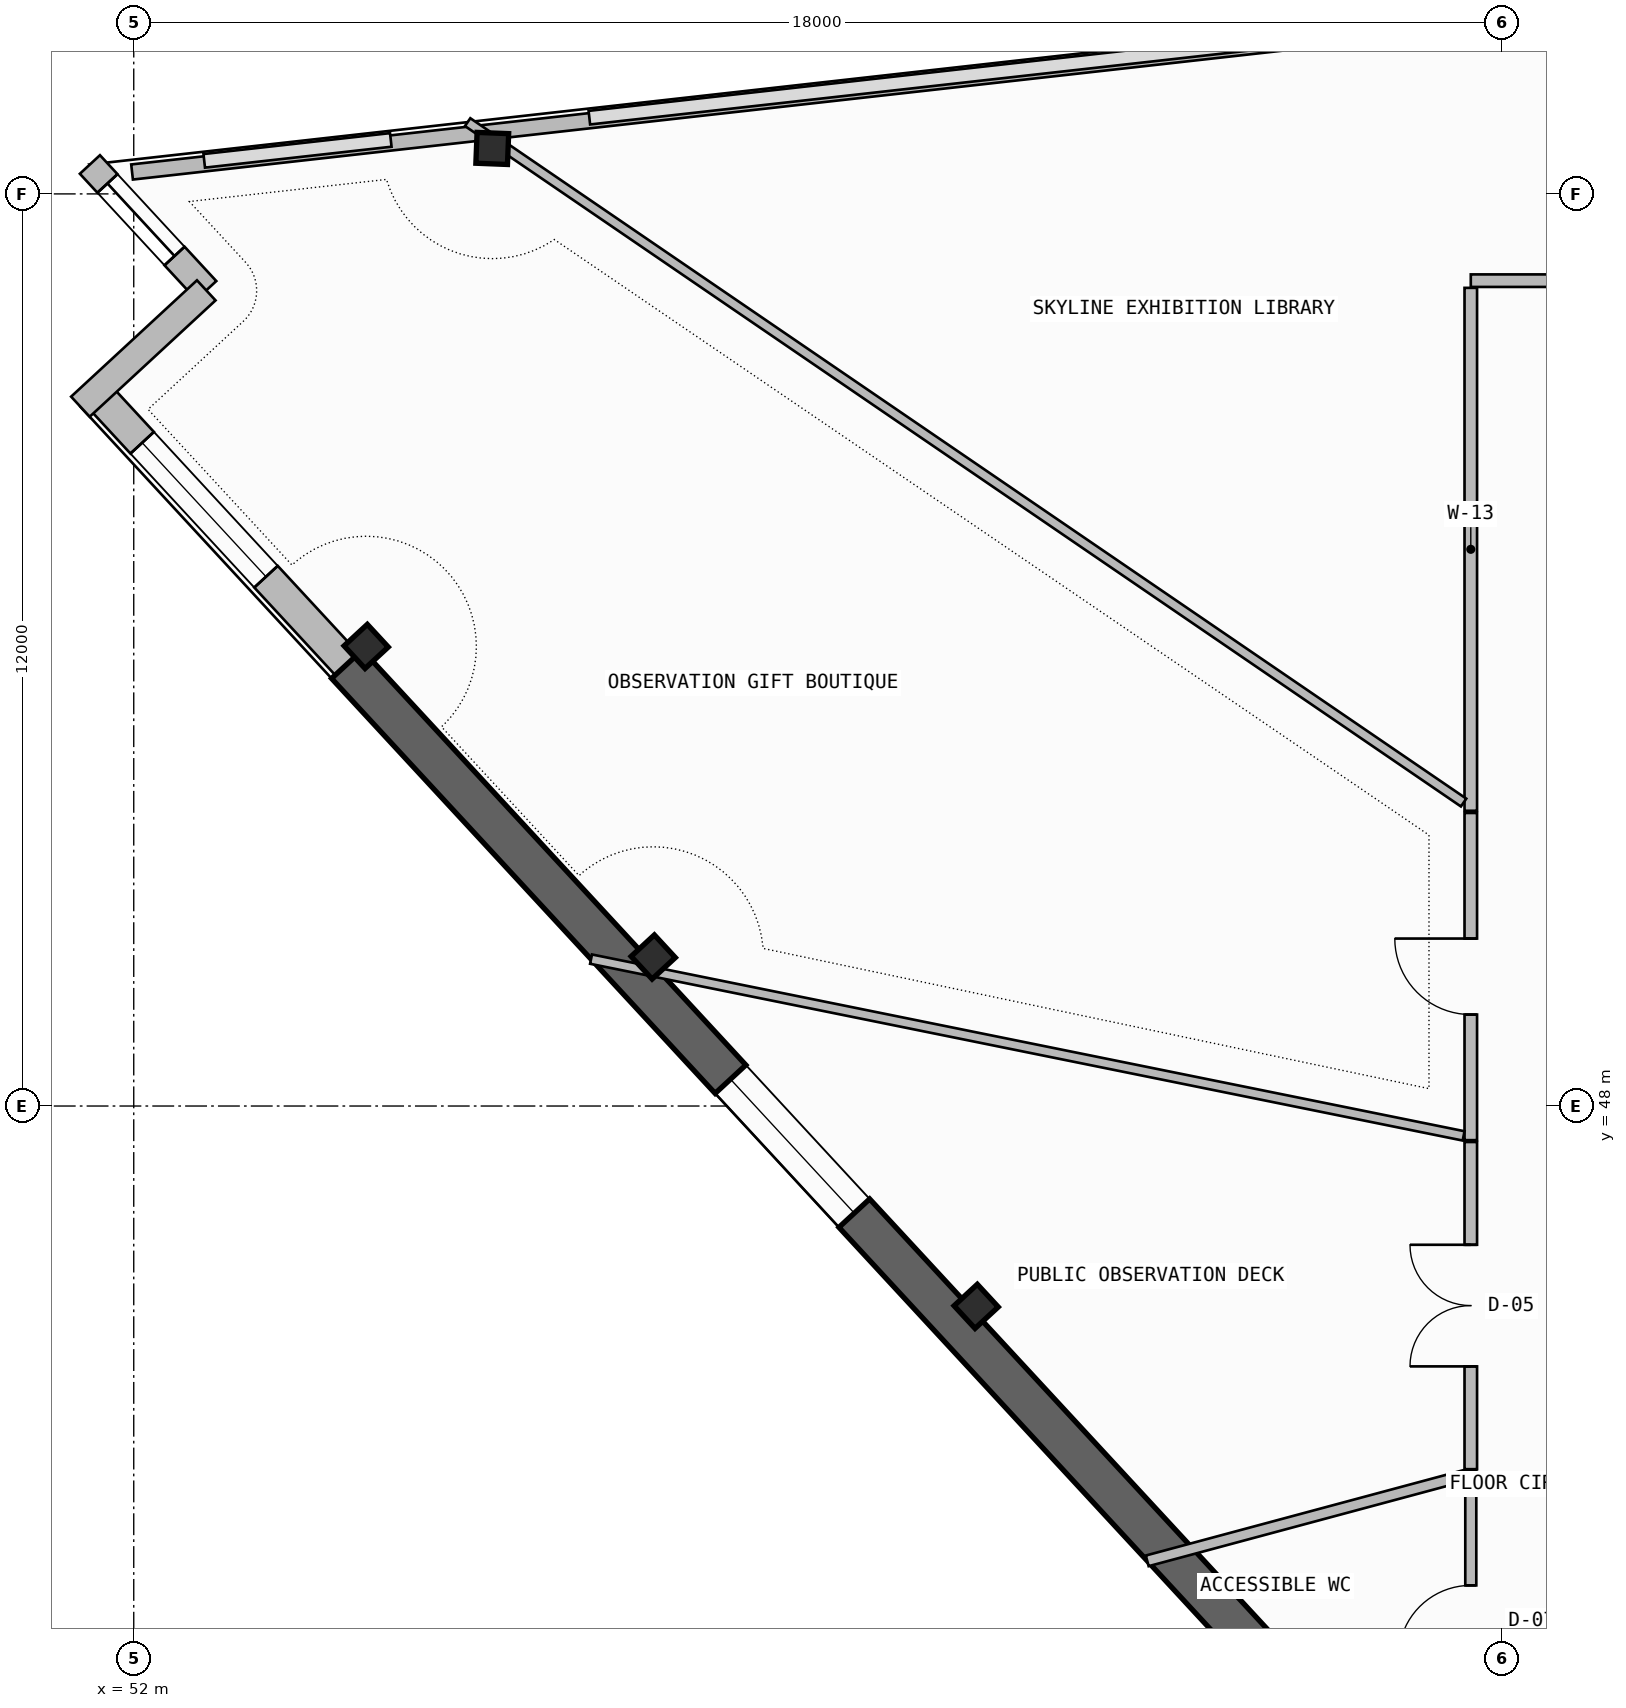
"""IFC4 building model, lengths in metres.
Left out: names, types, materials, properties, quantities, classifications, styles, units other than length and angle.
Written with IfcOpenShell. Run it as: python <this file> out.ifc"""

import sys

from ifc_helpers import new_model, si_unit, direction, frame, frame_2d, origin, origin_2d, place, context, subcontext, project, spatial, rectangle, i_section, extrude, element, fill, save


model = new_model("IFC4")
c1 = context("Model", 3, precision=1e-05, world=origin(), true_north=direction((0.0, 1.0)))
c2 = subcontext(c1, "Body", "Model", "MODEL_VIEW")
j1 = project(units=[si_unit("LENGTHUNIT", "METRE"), si_unit("PLANEANGLEUNIT", "RADIAN")], contexts=[c1])
p1 = place(None, origin())
s1 = spatial("IfcSite", under=j1, at=p1, CompositionType="ELEMENT")
p2 = place(p1, origin())
s2 = spatial("IfcBuilding", under=s1, at=p2, CompositionType="ELEMENT")
p3 = place(p2, frame((0.0, 0.0, 288.9)))
s3 = spatial("IfcBuildingStorey", under=s2, at=p3, CompositionType="ELEMENT", Elevation=288.9)
for number, where, z_axis, x_axis in (
    (1, (56.717, 60.598, 0.0), (0.0, 0.0, 1.0), (0.039, 0.999, 0.0)),
    (2, (55.058, 54.046, 0.0), (0.0, 0.0, 1.0), (-0.679, 0.734, 0.0)),
    (3, (58.835, 49.961, 0.0), (0.0, 0.0, 1.0), (-0.679, 0.734, 0.0)),
    (4, (63.084, 45.364, 0.0), (0.0, 0.0, 1.0), (-0.679, 0.734, 0.0)),
):
    element("IfcColumn", number, at=place(p3, frame(where, z_axis=z_axis, x_axis=x_axis)), inside=s3, PredefinedType="COLUMN", context=c2, shape_type="SweptSolid", body=[
        extrude(i_section(OverallWidth=0.406, OverallDepth=0.416, WebThickness=0.03, FlangeThickness=0.048, FilletRadius=0.015, at=origin_2d()), origin(), (0.0, 0.0, 1.0), 3.52),
    ])
p4 = place(p3, frame((51.5, 57.387, 0.0), z_axis=(0.0, 0.0, 1.0), x_axis=(0.67880684669, -0.734316869537, 0.0)))
e5 = element("IfcWall", 5, at=p4, inside=s3, PredefinedType="SOLIDWALL", context=c2, shape_type="SweptSolid", body=[
    extrude(rectangle(XDim=4.869, YDim=0.42, at=frame_2d((2.434, 0.0))), origin(), (0.0, 0.0, 1.0), 2.645),
])
p5 = place(p4, frame((0.9, 0.0, 1.1)))
e6 = element("IfcOpeningElement", 6, at=p5, cuts=e5, PredefinedType="OPENING", context=c2, shape_type="SweptSolid", body=[
    extrude(rectangle(XDim=2.4, YDim=1.2, at=frame_2d((1.2, 0.6))), frame((0.0, 0.22, 0.0), z_axis=(0.0, -1.0, 0.0), x_axis=(1.0, 0.0, 0.0)), (0.0, 0.0, 1.0), 0.44),
])
p6 = place(p3, frame((54.805, 53.812, -0.26), z_axis=(0.0, 0.0, 1.0), x_axis=(0.678803115619, -0.734320318543, 0.0)))
e7 = element("IfcWall", 7, at=p6, inside=s3, PredefinedType="SHEAR", context=c2, shape_type="SweptSolid", body=[
    extrude(rectangle(XDim=18.083, YDim=0.55, at=frame_2d((9.042, 0.0))), origin(), (0.0, 0.0, 1.0), 3.52),
])
p7 = place(p6, frame((7.434, 0.0, 1.1)))
e8 = element("IfcOpeningElement", 8, at=p7, cuts=e7, PredefinedType="OPENING", context=c2, shape_type="SweptSolid", body=[
    extrude(rectangle(XDim=2.4, YDim=1.2, at=frame_2d((1.2, 0.6))), frame((0.0, 0.285, 0.0), z_axis=(0.0, -1.0, 0.0), x_axis=(1.0, 0.0, 0.0)), (0.0, 0.0, 1.0), 0.57),
])
p8 = place(p3, frame((51.423, 60.387, 0.0), z_axis=(0.0, 0.0, 1.0), x_axis=(0.678792531533, -0.734330102294, 0.0)))
e9 = element("IfcWall", 9, at=p8, inside=s3, PredefinedType="SOLIDWALL", context=c2, shape_type="SweptSolid", body=[
    extrude(rectangle(XDim=2.255, YDim=0.36, at=frame_2d((1.127, 0.0))), origin(), (0.0, 0.0, 1.0), 3.26),
])
p9 = place(p8, frame((0.34, 0.0, 0.45)))
e10 = element("IfcOpeningElement", 10, at=p9, cuts=e9, PredefinedType="OPENING", context=c2, shape_type="SweptSolid", body=[
    extrude(rectangle(XDim=1.3, YDim=2.4, at=frame_2d((0.65, 1.2))), frame((0.0, 0.19, 0.0), z_axis=(0.0, -1.0, 0.0), x_axis=(1.0, 0.0, 0.0)), (0.0, 0.0, 1.0), 0.38),
])
p10 = place(p3, frame((52.954, 58.731, 0.0), z_axis=(0.0, 0.0, 1.0), x_axis=(-0.734330102294, -0.678792531533, 0.0)))
e11 = element("IfcWall", 11, at=p10, inside=s3, PredefinedType="SOLIDWALL", context=c2, shape_type="SweptSolid", body=[
    extrude(rectangle(XDim=2.255, YDim=0.36, at=frame_2d((1.127, 0.0))), origin(), (0.0, 0.0, 1.0), 3.26),
])
p11 = place(p3, frame((81.557, 63.604, 0.0), z_axis=(0.0, 0.0, 1.0), x_axis=(-0.993775831398, -0.111398370403, 0.0)))
e12 = element("IfcWall", 12, at=p11, inside=s3, PredefinedType="PARAPET", context=c2, shape_type="SweptSolid", body=[
    extrude(rectangle(XDim=29.764, YDim=0.2, at=frame_2d((14.882, 0.0))), origin(), (0.0, 0.0, 1.0), 1.15),
])
p12 = place(p3, frame((69.592, 43.198, 0.0), z_axis=(0.0, 0.0, 1.0), x_axis=(0.0, -1.0, 0.0)))
e13 = element("IfcWall", 13, at=p12, inside=s3, PredefinedType="PARTITIONING", context=c2, shape_type="SweptSolid", body=[
    extrude(rectangle(XDim=3.356, YDim=0.145, at=frame_2d((1.678, 0.0))), origin(), (0.0, 0.0, 1.0), 3.26),
])
p13 = place(p12, frame((1.504, 0.0, 0.0)))
e14 = element("IfcOpeningElement", 14, at=p13, cuts=e13, PredefinedType="OPENING", context=c2, shape_type="SweptSolid", body=[
    extrude(rectangle(XDim=0.95, YDim=2.15, at=frame_2d((0.475, 1.075))), frame((0.0, 0.083, 0.0), z_axis=(0.0, -1.0, 0.0), x_axis=(1.0, 0.0, 0.0)), (0.0, 0.0, 1.0), 0.165),
])
p14 = place(p3, frame((65.334, 42.016, 0.0), z_axis=(0.0, 0.0, 1.0), x_axis=(0.965738942055, 0.259515502039, 0.0)))
e15 = element("IfcWall", 15, at=p14, inside=s3, PredefinedType="PARTITIONING", context=c2, shape_type="SweptSolid", body=[
    extrude(rectangle(XDim=4.321, YDim=0.145, at=frame_2d((2.16, 0.0))), origin(), (0.0, 0.0, 1.0), 2.645),
])
p15 = place(p3, frame((77.111, 58.858, 0.0), z_axis=(0.0, 0.0, 1.0), x_axis=(-1.0, 0.0, 0.0)))
e16 = element("IfcWall", 16, at=p15, inside=s3, PredefinedType="PARTITIONING", context=c2, shape_type="SweptSolid", body=[
    extrude(rectangle(XDim=7.519, YDim=0.165, at=frame_2d((3.76, 0.0))), origin(), (0.0, 0.0, 1.0), 3.26),
])
p16 = place(p15, frame((1.546, 0.0, 0.0)))
e17 = element("IfcOpeningElement", 17, at=p16, cuts=e16, PredefinedType="OPENING", context=c2, shape_type="SweptSolid", body=[
    extrude(rectangle(XDim=1.0, YDim=2.2, at=frame_2d((0.5, 1.1))), frame((0.0, 0.093, 0.0), z_axis=(0.0, -1.0, 0.0), x_axis=(1.0, 0.0, 0.0)), (0.0, 0.0, 1.0), 0.185),
])
p17 = place(p3, frame((69.592, 58.764, 0.0), z_axis=(0.0, 0.0, 1.0), x_axis=(0.0, -1.0, 0.0)))
e18 = element("IfcWall", 18, at=p17, inside=s3, PredefinedType="PARTITIONING", context=c2, shape_type="SweptSolid", body=[
    extrude(rectangle(XDim=6.88, YDim=0.165, at=frame_2d((3.44, 0.0))), origin(), (0.0, 0.0, 1.0), 2.745),
])
p18 = place(p3, frame((69.497, 51.992, 0.0), z_axis=(0.0, 0.0, 1.0), x_axis=(-0.825720238729, 0.564079859021, 0.0)))
e19 = element("IfcWall", 19, at=p18, inside=s3, PredefinedType="PARTITIONING", context=c2, shape_type="SweptSolid", body=[
    extrude(rectangle(XDim=15.869, YDim=0.125, at=frame_2d((7.935, 0.0))), origin(), (0.0, 0.0, 1.0), 2.645),
])
p19 = place(p3, frame((69.592, 51.855, 0.0), z_axis=(0.0, 0.0, 1.0), x_axis=(0.0, -1.0, 0.0)))
e20 = element("IfcWall", 20, at=p19, inside=s3, PredefinedType="PARTITIONING", context=c2, shape_type="SweptSolid", body=[
    extrude(rectangle(XDim=4.304, YDim=0.165, at=frame_2d((2.152, 0.0))), origin(), (0.0, 0.0, 1.0), 2.745),
])
p20 = place(p19, frame((1.652, 0.0, 0.0)))
e21 = element("IfcOpeningElement", 21, at=p20, cuts=e20, PredefinedType="OPENING", context=c2, shape_type="SweptSolid", body=[
    extrude(rectangle(XDim=1.0, YDim=2.2, at=frame_2d((0.5, 1.1))), frame((0.0, 0.093, 0.0), z_axis=(0.0, -1.0, 0.0), x_axis=(1.0, 0.0, 0.0)), (0.0, 0.0, 1.0), 0.185),
])
p21 = place(p3, frame((69.497, 47.607, 0.0), z_axis=(0.0, 0.0, 1.0), x_axis=(-0.980091879714, 0.19854447189, 0.0)))
e22 = element("IfcWall", 22, at=p21, inside=s3, PredefinedType="PARTITIONING", context=c2, shape_type="SweptSolid", body=[
    extrude(rectangle(XDim=11.714, YDim=0.125, at=frame_2d((5.857, 0.0))), origin(), (0.0, 0.0, 1.0), 2.645),
])
p22 = place(p3, frame((69.592, 47.527, 0.0), z_axis=(0.0, 0.0, 1.0), x_axis=(0.0, -1.0, 0.0)))
e23 = element("IfcWall", 23, at=p22, inside=s3, PredefinedType="PARTITIONING", context=c2, shape_type="SweptSolid", body=[
    extrude(rectangle(XDim=4.304, YDim=0.165, at=frame_2d((2.152, 0.0))), origin(), (0.0, 0.0, 1.0), 3.26),
])
p23 = place(p22, frame((1.352, 0.0, 0.0)))
e24 = element("IfcOpeningElement", 24, at=p23, cuts=e23, PredefinedType="OPENING", context=c2, shape_type="SweptSolid", body=[
    extrude(rectangle(XDim=1.6, YDim=2.3, at=frame_2d((0.8, 1.15))), frame((0.0, 0.093, 0.0), z_axis=(0.0, -1.0, 0.0), x_axis=(1.0, 0.0, 0.0)), (0.0, 0.0, 1.0), 0.185),
])
p24 = place(p5, origin())
e25 = element("IfcWindow", 25, at=p24, inside=s3, PartitioningType="SINGLE_PANEL", PredefinedType="WINDOW", context=c2, shape_type="SweptSolid", body=[
    extrude(rectangle(XDim=2.4, YDim=1.2, at=frame_2d((1.2, 0.6))), frame((0.0, 0.03, 0.0), z_axis=(0.0, -1.0, 0.0), x_axis=(1.0, 0.0, 0.0)), (0.0, 0.0, 1.0), 0.06),
])
fill(e6, e25)
p25 = place(p7, origin())
e26 = element("IfcWindow", 26, at=p25, inside=s3, PartitioningType="SINGLE_PANEL", PredefinedType="WINDOW", context=c2, shape_type="SweptSolid", body=[
    extrude(rectangle(XDim=2.4, YDim=1.2, at=frame_2d((1.2, 0.6))), frame((0.0, 0.03, 0.0), z_axis=(0.0, -1.0, 0.0), x_axis=(1.0, 0.0, 0.0)), (0.0, 0.0, 1.0), 0.06),
])
fill(e8, e26)
p26 = place(p9, origin())
e27 = element("IfcWindow", 27, at=p26, inside=s3, PartitioningType="SINGLE_PANEL", PredefinedType="WINDOW", context=c2, shape_type="SweptSolid", body=[
    extrude(rectangle(XDim=1.3, YDim=2.4, at=frame_2d((0.65, 1.2))), frame((0.0, 0.03, 0.0), z_axis=(0.0, -1.0, 0.0), x_axis=(1.0, 0.0, 0.0)), (0.0, 0.0, 1.0), 0.06),
])
fill(e10, e27)
p27 = place(p13, frame((0.95, 0.0, 0.0), z_axis=(0.0, 0.0, 1.0), x_axis=(-1.0, 0.0, 0.0)))
e28 = element("IfcDoor", 28, at=p27, inside=s3, OperationType="SINGLE_SWING_LEFT", PredefinedType="DOOR", context=c2, shape_type="SweptSolid", body=[
    extrude(rectangle(XDim=0.95, YDim=2.15, at=frame_2d((0.475, 1.075))), frame((0.0, 0.025, 0.0), z_axis=(0.0, -1.0, 0.0), x_axis=(1.0, 0.0, 0.0)), (0.0, 0.0, 1.0), 0.05),
])
fill(e14, e28)
p28 = place(p20, frame((1.0, 0.0, 0.0), z_axis=(0.0, 0.0, 1.0), x_axis=(-1.0, 0.0, 0.0)))
e29 = element("IfcDoor", 29, at=p28, inside=s3, OperationType="SINGLE_SWING_RIGHT", PredefinedType="DOOR", context=c2, shape_type="SweptSolid", body=[
    extrude(rectangle(XDim=1.0, YDim=2.2, at=frame_2d((0.5, 1.1))), frame((0.0, 0.025, 0.0), z_axis=(0.0, -1.0, 0.0), x_axis=(1.0, 0.0, 0.0)), (0.0, 0.0, 1.0), 0.05),
])
fill(e21, e29)
p29 = place(p23, frame((1.6, 0.0, 0.0), z_axis=(0.0, 0.0, 1.0), x_axis=(-1.0, 0.0, 0.0)))
e30 = element("IfcDoor", 30, at=p29, inside=s3, OperationType="DOUBLE_DOOR_SINGLE_SWING", PredefinedType="DOOR", context=c2, shape_type="SweptSolid", body=[
    extrude(rectangle(XDim=1.6, YDim=2.3, at=frame_2d((0.8, 1.15))), frame((0.0, 0.025, 0.0), z_axis=(0.0, -1.0, 0.0), x_axis=(1.0, 0.0, 0.0)), (0.0, 0.0, 1.0), 0.05),
])
fill(e24, e30)
save(model, sys.argv[1])
